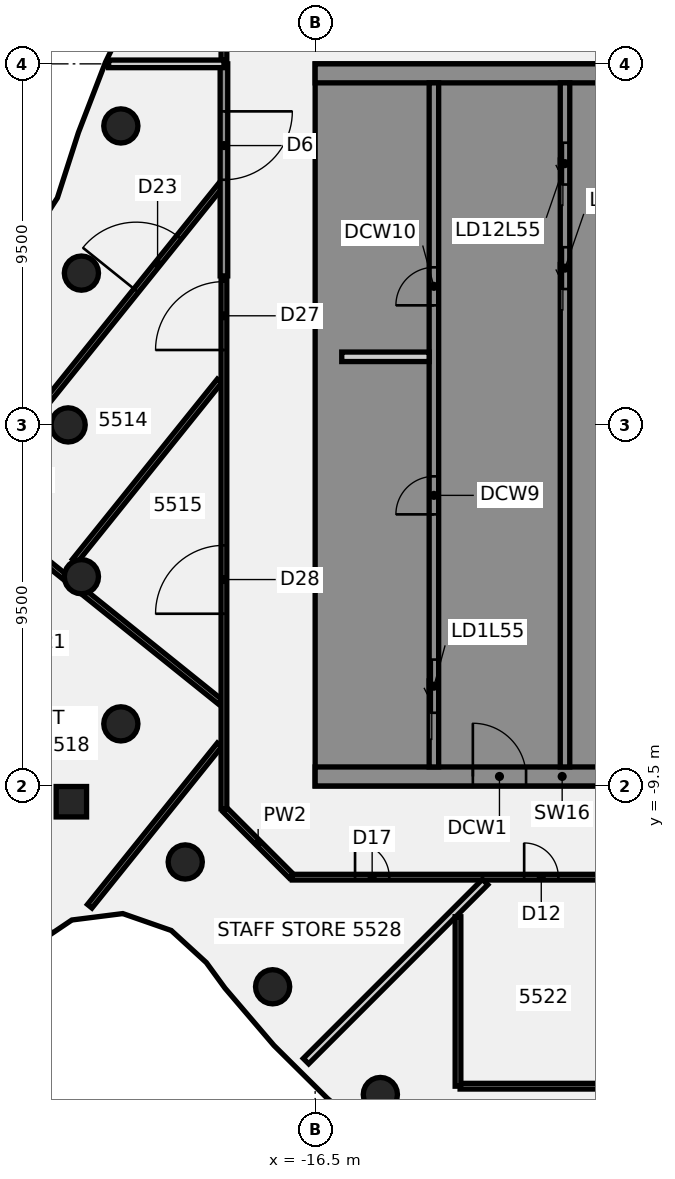
"""IFC4 building model, lengths in metres.
Left out: names, types, materials, properties, quantities, classifications, styles, units other than length and angle.
Written with IfcOpenShell. Run it as: python <this file> out.ifc"""

import sys

from ifc_helpers import new_model, si_unit, direction, frame, frame_2d, origin, origin_2d, place, context, subcontext, project, spatial, polyline, rectangle, circle, outline, extrude, element, fill, save


model = new_model("IFC4")
c1 = context("Model", 3, precision=1e-05, world=origin(), true_north=direction((0.0, 1.0)))
c2 = subcontext(c1, "Body", "Model", "MODEL_VIEW")
j1 = project(units=[si_unit("LENGTHUNIT", "METRE"), si_unit("PLANEANGLEUNIT", "RADIAN")], contexts=[c1])
p1 = place(None, origin())
s1 = spatial("IfcSite", under=j1, at=p1, CompositionType="ELEMENT")
p2 = place(p1, origin())
s2 = spatial("IfcBuilding", under=s1, at=p2, CompositionType="ELEMENT")
p3 = place(p2, frame((0.0, 0.0, 219.9)))
s3 = spatial("IfcBuildingStorey", under=s2, at=p3, CompositionType="ELEMENT", Elevation=219.9)
for number, where, z_axis, x_axis in (
    (1, (-21.613, 7.866, -0.14), (0.0, 0.0, 1.0), (1.0, 0.0, 0.0)),
    (2, (-22.651, 3.994, -0.14), (0.0, 0.0, 1.0), (1.0, 0.0, 0.0)),
    (3, (-23.0, 0.0, -0.14), (0.0, 0.0, 1.0), (1.0, 0.0, 0.0)),
    (4, (-22.651, -3.994, -0.14), (0.0, 0.0, 1.0), (1.0, 0.0, 0.0)),
    (5, (-21.613, -7.866, -0.14), (0.0, 0.0, 1.0), (1.0, 0.0, 0.0)),
    (6, (-19.919, -11.5, -0.14), (0.0, 0.0, 1.0), (1.0, 0.0, 0.0)),
    (7, (-17.619, -14.784, -0.14), (0.0, 0.0, 1.0), (1.0, 0.0, 0.0)),
    (8, (-14.784, -17.619, -0.14), (0.0, 0.0, 1.0), (1.0, 0.0, 0.0)),
):
    element("IfcColumn", number, at=place(p3, frame(where, z_axis=z_axis, x_axis=x_axis)), inside=s3, PredefinedType="COLUMN", context=c2, shape_type="SweptSolid", body=[
        extrude(circle(Radius=0.45, at=origin_2d()), origin(), (0.0, 0.0, 1.0), 3.6),
    ])
p4 = place(p3, frame((-22.915, -9.915, -0.134), z_axis=(0.050218113387, -0.004139601239, 0.998729695558), x_axis=(-0.7786689847, 0.626044507658, 0.04174789452)))
e9 = element("IfcColumn", 9, at=p4, inside=s3, PredefinedType="COLUMN", context=c2, shape_type="SweptSolid", body=[
    extrude(rectangle(XDim=0.8, YDim=0.8, at=origin_2d()), origin(), (0.0, 0.0, 1.0), 3.598),
])
p5 = place(p3, frame((-18.872, -10.128, 0.0), z_axis=(0.0, 0.0, 1.0), x_axis=(0.707106781187, -0.707106781187, 0.0)))
e10 = element("IfcWall", 10, at=p5, inside=s3, PredefinedType="PARTITIONING", context=c2, shape_type="SweptSolid", body=[
    extrude(rectangle(XDim=2.465, YDim=0.15, at=frame_2d((1.232, 0.0))), origin(), (0.0, 0.0, 1.0), 2.864),
])
p6 = place(p3, frame((-29.602, 1.236, 0.0), z_axis=(0.0, 0.0, 1.0), x_axis=(0.779408775424, -0.626515730681, 0.0)))
e11 = element("IfcWall", 11, at=p6, inside=s3, PredefinedType="PARTITIONING", context=c2, shape_type="SweptSolid", body=[
    extrude(rectangle(XDim=8.332, YDim=0.15, at=frame_2d((4.166, 0.0))), origin(), (0.0, 0.0, 1.0), 2.864),
])
p7 = place(p6, frame((5.799, 0.0, 0.0)))
e12 = element("IfcOpeningElement", 12, at=p7, cuts=e11, PredefinedType="OPENING", context=c2, shape_type="SweptSolid", body=[
    extrude(rectangle(XDim=1.4, YDim=2.1, at=frame_2d((0.7, 1.05))), frame((0.0, 0.085, 0.0), z_axis=(0.0, -1.0, 0.0), x_axis=(1.0, 0.0, 0.0)), (0.0, 0.0, 1.0), 0.17),
])
p8 = place(p3, frame((-22.555, -4.428, 0.0), z_axis=(0.0, 0.0, 1.0), x_axis=(0.779423896045, -0.626496919604, 0.0)))
e13 = element("IfcWall", 13, at=p8, inside=s3, PredefinedType="PARTITIONING", context=c2, shape_type="SweptSolid", body=[
    extrude(rectangle(XDim=4.556, YDim=0.15, at=frame_2d((2.278, 0.0))), origin(), (0.0, 0.0, 1.0), 2.864),
])
p9 = place(p3, frame((-17.1, -11.9, 0.0), z_axis=(0.0, 0.0, 1.0), x_axis=(1.0, 0.0, 0.0)))
e14 = element("IfcWall", 14, at=p9, inside=s3, PredefinedType="PARTITIONING", context=c2, shape_type="SweptSolid", body=[
    extrude(rectangle(XDim=34.165, YDim=0.15, at=frame_2d((17.083, 0.0))), origin(), (0.0, 0.0, 1.0), 2.864),
])
p10 = place(p9, frame((6.1, 0.0, 0.0)))
e15 = element("IfcOpeningElement", 15, at=p10, cuts=e14, PredefinedType="OPENING", context=c2, shape_type="SweptSolid", body=[
    extrude(rectangle(XDim=0.9, YDim=2.1, at=frame_2d((0.45, 1.05))), frame((0.0, 0.085, 0.0), z_axis=(0.0, -1.0, 0.0), x_axis=(1.0, 0.0, 0.0)), (0.0, 0.0, 1.0), 0.17),
])
p11 = place(p9, frame((27.541, 0.0, 0.0)))
e16 = element("IfcOpeningElement", 16, at=p11, cuts=e14, PredefinedType="OPENING", context=c2, shape_type="SweptSolid", body=[
    extrude(rectangle(XDim=0.9, YDim=2.1, at=frame_2d((0.45, 1.05))), frame((0.0, 0.085, 0.0), z_axis=(0.0, -1.0, 0.0), x_axis=(1.0, 0.0, 0.0)), (0.0, 0.0, 1.0), 0.17),
])
p12 = place(p9, frame((19.152, 0.0, 0.0)))
e17 = element("IfcOpeningElement", 17, at=p12, cuts=e14, PredefinedType="OPENING", context=c2, shape_type="SweptSolid", body=[
    extrude(rectangle(XDim=1.8, YDim=2.1, at=frame_2d((0.9, 1.05))), frame((0.0, 0.085, 0.0), z_axis=(0.0, -1.0, 0.0), x_axis=(1.0, 0.0, 0.0)), (0.0, 0.0, 1.0), 0.17),
])
p13 = place(p9, frame((10.359, 0.0, 0.0)))
e18 = element("IfcOpeningElement", 18, at=p13, cuts=e14, PredefinedType="OPENING", context=c2, shape_type="SweptSolid", body=[
    extrude(rectangle(XDim=1.8, YDim=2.1, at=frame_2d((0.9, 1.05))), frame((0.0, 0.085, 0.0), z_axis=(0.0, -1.0, 0.0), x_axis=(1.0, 0.0, 0.0)), (0.0, 0.0, 1.0), 0.17),
])
p14 = place(p9, frame((30.5, 0.0, 0.0)))
e19 = element("IfcOpeningElement", 19, at=p14, cuts=e14, PredefinedType="OPENING", context=c2, shape_type="SweptSolid", body=[
    extrude(rectangle(XDim=0.9, YDim=2.1, at=frame_2d((0.45, 1.05))), frame((0.0, 0.085, 0.0), z_axis=(0.0, -1.0, 0.0), x_axis=(1.0, 0.0, 0.0)), (0.0, 0.0, 1.0), 0.17),
])
p15 = place(p9, frame((1.65, 0.0, 0.0)))
e20 = element("IfcOpeningElement", 20, at=p15, cuts=e14, PredefinedType="OPENING", context=c2, shape_type="SweptSolid", body=[
    extrude(rectangle(XDim=0.9, YDim=2.1, at=frame_2d((0.45, 1.05))), frame((0.0, 0.085, 0.0), z_axis=(0.0, -1.0, 0.0), x_axis=(1.0, 0.0, 0.0)), (0.0, 0.0, 1.0), 0.17),
])
p16 = place(p3, frame((-12.686, -17.4, 0.0), z_axis=(0.0, 0.0, 1.0), x_axis=(1.0, 0.0, 0.0)))
e21 = element("IfcWall", 21, at=p16, inside=s3, PredefinedType="PARTITIONING", context=c2, shape_type="SweptSolid", body=[
    extrude(rectangle(XDim=4.39, YDim=0.15, at=frame_2d((2.195, 0.0))), origin(), (0.0, 0.0, 1.0), 2.864),
])
p17 = place(p3, frame((-16.74, -16.74, 0.0), z_axis=(0.0, 0.0, 1.0), x_axis=(0.707106781187, 0.707106781187, 0.0)))
e22 = element("IfcWall", 22, at=p17, inside=s3, PredefinedType="PARTITIONING", context=c2, shape_type="SweptSolid", body=[
    extrude(rectangle(XDim=6.665, YDim=0.2, at=frame_2d((3.333, 0.0))), origin(), (0.0, 0.0, 1.0), 2.864),
])
p18 = place(p3, frame((-25.578, -1.897, 0.0), z_axis=(0.0, 0.0, 1.0), x_axis=(0.626651590672, 0.779299546971, 0.0)))
e23 = element("IfcWall", 23, at=p18, inside=s3, PredefinedType="PARTITIONING", context=c2, shape_type="SweptSolid", body=[
    extrude(rectangle(XDim=10.656, YDim=0.15, at=frame_2d((5.328, 0.0))), origin(), (0.0, 0.0, 1.0), 2.864),
])
p19 = place(p18, frame((6.97, 0.0, 0.0)))
e24 = element("IfcOpeningElement", 24, at=p19, cuts=e23, PredefinedType="OPENING", context=c2, shape_type="SweptSolid", body=[
    extrude(rectangle(XDim=1.8, YDim=2.1, at=frame_2d((0.9, 1.05))), frame((0.0, 0.085, 0.0), z_axis=(0.0, -1.0, 0.0), x_axis=(1.0, 0.0, 0.0)), (0.0, 0.0, 1.0), 0.17),
])
p20 = place(p3, frame((-22.826, -3.581, 0.0), z_axis=(0.0, 0.0, 1.0), x_axis=(0.626622427276, 0.779322996988, 0.0)))
e25 = element("IfcWall", 25, at=p20, inside=s3, PredefinedType="PARTITIONING", context=c2, shape_type="SweptSolid", body=[
    extrude(rectangle(XDim=6.08, YDim=0.15, at=frame_2d((3.04, 0.0))), origin(), (0.0, 0.0, 1.0), 2.864),
])
p21 = place(p3, frame((-22.432, -12.665, 0.0), z_axis=(0.0, 0.0, 1.0), x_axis=(0.626703070083, 0.779258148464, 0.0)))
e26 = element("IfcWall", 26, at=p21, inside=s3, PredefinedType="PARTITIONING", context=c2, shape_type="SweptSolid", body=[
    extrude(rectangle(XDim=5.451, YDim=0.15, at=frame_2d((2.725, 0.0))), origin(), (0.0, 0.0, 1.0), 2.864),
])
p22 = place(p3, frame((-18.9, -10.1, 0.0), z_axis=(0.0, 0.0, 1.0), x_axis=(0.0, 1.0, 0.0)))
e27 = element("IfcWall", 27, at=p22, inside=s3, PredefinedType="PARTITIONING", context=c2, shape_type="SweptSolid", body=[
    extrude(rectangle(XDim=13.921, YDim=0.15, at=frame_2d((6.96, 0.0))), origin(), (0.0, 0.0, 1.0), 2.864),
])
p23 = place(p22, frame((12.071, 0.0, 0.0)))
e28 = element("IfcOpeningElement", 28, at=p23, cuts=e27, PredefinedType="OPENING", context=c2, shape_type="SweptSolid", body=[
    extrude(rectangle(XDim=1.8, YDim=2.1, at=frame_2d((0.9, 1.05))), frame((0.0, 0.085, 0.0), z_axis=(0.0, -1.0, 0.0), x_axis=(1.0, 0.0, 0.0)), (0.0, 0.0, 1.0), 0.17),
])
p24 = place(p22, frame((5.131, 0.0, 0.0)))
e29 = element("IfcOpeningElement", 29, at=p24, cuts=e27, PredefinedType="OPENING", context=c2, shape_type="SweptSolid", body=[
    extrude(rectangle(XDim=1.8, YDim=2.1, at=frame_2d((0.9, 1.05))), frame((0.0, 0.085, 0.0), z_axis=(0.0, -1.0, 0.0), x_axis=(1.0, 0.0, 0.0)), (0.0, 0.0, 1.0), 0.17),
])
p25 = place(p3, frame((-18.9, 9.6, 0.0), z_axis=(0.0, 0.0, 1.0), x_axis=(0.0, 1.0, 0.0)))
e30 = element("IfcWall", 30, at=p25, inside=s3, PredefinedType="PARTITIONING", context=c2, shape_type="SweptSolid", body=[
    extrude(rectangle(XDim=0.5, YDim=0.15, at=frame_2d((0.25, 0.0))), origin(), (0.0, 0.0, 1.0), 2.864),
])
p26 = place(p3, frame((-12.741, -17.4, 0.0), z_axis=(0.0, 0.0, 1.0), x_axis=(0.0, 1.0, 0.0)))
e31 = element("IfcWall", 31, at=p26, inside=s3, PredefinedType="PARTITIONING", context=c2, shape_type="SweptSolid", body=[
    extrude(rectangle(XDim=4.459, YDim=0.15, at=frame_2d((2.229, 0.0))), origin(), (0.0, 0.0, 1.0), 2.864),
])
p27 = place(p3, frame((-18.9, 9.5, 0.0), z_axis=(0.0, 0.0, 1.0), x_axis=(0.0, -1.0, 0.0)))
e32 = element("IfcWall", 32, at=p27, inside=s3, PredefinedType="SOLIDWALL", context=c2, shape_type="SweptSolid", body=[
    extrude(rectangle(XDim=5.579, YDim=0.2, at=frame_2d((2.79, 0.0))), origin(), (0.0, 0.0, 1.0), 2.964),
])
p28 = place(p27, frame((1.25, 0.0, 0.0)))
e33 = element("IfcOpeningElement", 33, at=p28, cuts=e32, PredefinedType="OPENING", context=c2, shape_type="SweptSolid", body=[
    extrude(rectangle(XDim=1.8, YDim=2.4, at=frame_2d((0.9, 1.2))), frame((0.0, 0.11, 0.0), z_axis=(0.0, -1.0, 0.0), x_axis=(1.0, 0.0, 0.0)), (0.0, 0.0, 1.0), 0.22),
])
p29 = place(p3, frame((-18.9, 9.5, 0.0), z_axis=(0.0, 0.0, 1.0), x_axis=(-1.0, 0.0, 0.0)))
e34 = element("IfcWall", 34, at=p29, inside=s3, PredefinedType="SOLIDWALL", context=c2, shape_type="SweptSolid", body=[
    extrude(rectangle(XDim=3.033, YDim=0.2, at=frame_2d((1.517, 0.0))), origin(), (0.0, 0.0, 1.0), 3.46),
])
p30 = place(p3, frame((-16.5, -9.25, 0.0), z_axis=(0.0, 0.0, 1.0), x_axis=(1.0, 0.0, 0.0)))
e35 = element("IfcWall", 35, at=p30, inside=s3, PredefinedType="SHEAR", context=c2, shape_type="SweptSolid", body=[
    extrude(rectangle(XDim=13.0, YDim=0.5, at=frame_2d((6.5, 0.0))), origin(), (0.0, 0.0, 1.0), 3.46),
])
p31 = place(p30, frame((4.15, 0.0, 0.0)))
e36 = element("IfcOpeningElement", 36, at=p31, cuts=e35, PredefinedType="OPENING", context=c2, shape_type="SweptSolid", body=[
    extrude(rectangle(XDim=1.4, YDim=2.1, at=frame_2d((0.7, 1.05))), frame((0.0, 0.26, 0.0), z_axis=(0.0, -1.0, 0.0), x_axis=(1.0, 0.0, 0.0)), (0.0, 0.0, 1.0), 0.52),
])
p32 = place(p30, frame((10.125, 0.0, 0.0)))
e37 = element("IfcOpeningElement", 37, at=p32, cuts=e35, PredefinedType="OPENING", context=c2, shape_type="SweptSolid", body=[
    extrude(rectangle(XDim=1.4, YDim=2.1, at=frame_2d((0.7, 1.05))), frame((0.0, 0.26, 0.0), z_axis=(0.0, -1.0, 0.0), x_axis=(1.0, 0.0, 0.0)), (0.0, 0.0, 1.0), 0.52),
])
p33 = place(p3, origin())
e38 = element("IfcWall", 38, at=p33, inside=s3, PredefinedType="SHEAR", context=c2, shape_type="SweptSolid", body=[
    extrude(outline(polyline([(-13.5, -8.125), (-16.0, -8.125), (-16.0, -5.625), (-13.5, -5.625), (-13.5, -5.375), (-16.0, -5.375), (-16.0, 5.375), (-13.5, 5.375), (-13.5, 5.625), (-16.0, 5.625), (-16.0, 8.125), (-13.5, 8.125), (-13.5, 9.0), (-16.0, 9.0), (-16.5, 9.0), (-16.5, -9.0), (-16.0, -9.0), (-13.5, -9.0), (-13.5, -8.125)])), origin(), (0.0, 0.0, 1.0), 3.46),
])
p34 = place(p3, frame((-16.5, 9.25, 0.0), z_axis=(0.0, 0.0, 1.0), x_axis=(1.0, 0.0, 0.0)))
e39 = element("IfcWall", 39, at=p34, inside=s3, PredefinedType="SHEAR", context=c2, shape_type="SweptSolid", body=[
    extrude(rectangle(XDim=13.0, YDim=0.5, at=frame_2d((6.5, 0.0))), origin(), (0.0, 0.0, 1.0), 3.46),
])
p35 = place(p3, origin())
e40 = element("IfcWall", 40, at=p35, inside=s3, PredefinedType="SHEAR", context=c2, shape_type="SweptSolid", body=[
    extrude(outline(polyline([(-9.8, -5.375), (-9.8, -5.625), (-7.5, -5.625), (-7.25, -5.625), (-7.25, 9.0), (-7.5, 9.0), (-9.8, 9.0), (-9.8, 8.125), (-7.5, 8.125), (-7.5, 5.625), (-9.8, 5.625), (-9.8, 5.375), (-7.5, 5.375), (-7.5, 2.875), (-9.8, 2.875), (-9.8, 2.625), (-7.5, 2.625), (-7.5, 0.125), (-9.8, 0.125), (-9.8, -0.125), (-7.5, -0.125), (-7.5, -2.625), (-9.8, -2.625), (-9.8, -2.875), (-7.5, -2.875), (-7.5, -5.375), (-9.8, -5.375)])), origin(), (0.0, 0.0, 1.0), 3.46),
])
p36 = place(p3, origin())
e41 = element("IfcWall", 41, at=p36, inside=s3, PredefinedType="SHEAR", context=c2, shape_type="SweptSolid", body=[
    extrude(outline(polyline([(-7.5, -8.125), (-9.55, -8.125), (-9.55, -5.625), (-9.8, -5.625), (-9.8, -8.125), (-9.8, -9.0), (-7.5, -9.0), (-7.5, -8.125)])), origin(), (0.0, 0.0, 1.0), 3.46),
])
p37 = place(p3, frame((-13.375, -9.0, 0.0), z_axis=(0.0, 0.0, 1.0), x_axis=(0.0, 1.0, 0.0)))
e42 = element("IfcWall", 42, at=p37, inside=s3, PredefinedType="SHEAR", context=c2, shape_type="SweptSolid", body=[
    extrude(rectangle(XDim=18.0, YDim=0.25, at=frame_2d((9.0, 0.0))), origin(), (0.0, 0.0, 1.0), 3.46),
])
p38 = place(p37, frame((1.425, 0.0, 0.0)))
e43 = element("IfcOpeningElement", 43, at=p38, cuts=e42, PredefinedType="OPENING", context=c2, shape_type="SweptSolid", body=[
    extrude(rectangle(XDim=1.4, YDim=2.1, at=frame_2d((0.7, 1.05))), frame((0.0, 0.135, 0.0), z_axis=(0.0, -1.0, 0.0), x_axis=(1.0, 0.0, 0.0)), (0.0, 0.0, 1.0), 0.27),
])
p39 = place(p37, frame((6.646, 0.0, 0.0)))
e44 = element("IfcOpeningElement", 44, at=p39, cuts=e42, PredefinedType="OPENING", context=c2, shape_type="SweptSolid", body=[
    extrude(rectangle(XDim=1.0, YDim=2.1, at=frame_2d((0.5, 1.05))), frame((0.0, 0.135, 0.0), z_axis=(0.0, -1.0, 0.0), x_axis=(1.0, 0.0, 0.0)), (0.0, 0.0, 1.0), 0.27),
])
p40 = place(p37, frame((12.146, 0.0, 0.0)))
e45 = element("IfcOpeningElement", 45, at=p40, cuts=e42, PredefinedType="OPENING", context=c2, shape_type="SweptSolid", body=[
    extrude(rectangle(XDim=1.0, YDim=2.1, at=frame_2d((0.5, 1.05))), frame((0.0, 0.135, 0.0), z_axis=(0.0, -1.0, 0.0), x_axis=(1.0, 0.0, 0.0)), (0.0, 0.0, 1.0), 0.27),
])
p41 = place(p3, frame((-9.925, -9.0, 0.0), z_axis=(0.0, 0.0, 1.0), x_axis=(0.0, 1.0, 0.0)))
e46 = element("IfcWall", 46, at=p41, inside=s3, PredefinedType="SHEAR", context=c2, shape_type="SweptSolid", body=[
    extrude(rectangle(XDim=18.0, YDim=0.25, at=frame_2d((9.0, 0.0))), origin(), (0.0, 0.0, 1.0), 3.46),
])
p42 = place(p41, frame((12.575, 0.0, 0.0)))
e47 = element("IfcOpeningElement", 47, at=p42, cuts=e46, PredefinedType="OPENING", context=c2, shape_type="SweptSolid", body=[
    extrude(rectangle(XDim=1.1, YDim=2.1, at=frame_2d((0.55, 1.05))), frame((0.0, 0.135, 0.0), z_axis=(0.0, -1.0, 0.0), x_axis=(1.0, 0.0, 0.0)), (0.0, 0.0, 1.0), 0.27),
])
p43 = place(p41, frame((15.325, 0.0, 0.0)))
e48 = element("IfcOpeningElement", 48, at=p43, cuts=e46, PredefinedType="OPENING", context=c2, shape_type="SweptSolid", body=[
    extrude(rectangle(XDim=1.1, YDim=2.1, at=frame_2d((0.55, 1.05))), frame((0.0, 0.135, 0.0), z_axis=(0.0, -1.0, 0.0), x_axis=(1.0, 0.0, 0.0)), (0.0, 0.0, 1.0), 0.27),
])
p44 = place(p3, frame((-15.8, 1.792, 0.0), z_axis=(0.0, 0.0, 1.0), x_axis=(1.0, 0.0, 0.0)))
e49 = element("IfcWall", 49, at=p44, inside=s3, PredefinedType="PARTITIONING", context=c2, shape_type="SweptSolid", body=[
    extrude(rectangle(XDim=2.3, YDim=0.25, at=frame_2d((1.15, 0.0))), origin(), (0.0, 0.0, 1.0), 3.46),
])
p45 = place(p10, frame((0.9, 0.0, 0.0), z_axis=(0.0, 0.0, 1.0), x_axis=(-1.0, 0.0, 0.0)))
e50 = element("IfcDoor", 50, at=p45, inside=s3, OperationType="SINGLE_SWING_LEFT", PredefinedType="DOOR", context=c2, shape_type="SweptSolid", body=[
    extrude(rectangle(XDim=0.9, YDim=2.1, at=frame_2d((0.45, 1.05))), frame((0.0, 0.025, 0.0), z_axis=(0.0, -1.0, 0.0), x_axis=(1.0, 0.0, 0.0)), (0.0, 0.0, 1.0), 0.05),
])
fill(e15, e50)
p46 = place(p15, frame((0.9, 0.0, 0.0), z_axis=(0.0, 0.0, 1.0), x_axis=(-1.0, 0.0, 0.0)))
e51 = element("IfcDoor", 51, at=p46, inside=s3, OperationType="SINGLE_SWING_LEFT", PredefinedType="DOOR", context=c2, shape_type="SweptSolid", body=[
    extrude(rectangle(XDim=0.9, YDim=2.1, at=frame_2d((0.45, 1.05))), frame((0.0, 0.025, 0.0), z_axis=(0.0, -1.0, 0.0), x_axis=(1.0, 0.0, 0.0)), (0.0, 0.0, 1.0), 0.05),
])
fill(e20, e51)
p47 = place(p19, origin())
e52 = element("IfcDoor", 52, at=p47, inside=s3, OperationType="DOUBLE_DOOR_SINGLE_SWING", PredefinedType="DOOR", context=c2, shape_type="SweptSolid", body=[
    extrude(rectangle(XDim=1.8, YDim=2.1, at=frame_2d((0.9, 1.05))), frame((0.0, 0.025, 0.0), z_axis=(0.0, -1.0, 0.0), x_axis=(1.0, 0.0, 0.0)), (0.0, 0.0, 1.0), 0.05),
])
fill(e24, e52)
p48 = place(p23, frame((1.8, 0.0, 0.0), z_axis=(0.0, 0.0, 1.0), x_axis=(-1.0, 0.0, 0.0)))
e53 = element("IfcDoor", 53, at=p48, inside=s3, OperationType="DOUBLE_DOOR_SINGLE_SWING", PredefinedType="DOOR", context=c2, shape_type="SweptSolid", body=[
    extrude(rectangle(XDim=1.8, YDim=2.1, at=frame_2d((0.9, 1.05))), frame((0.0, 0.025, 0.0), z_axis=(0.0, -1.0, 0.0), x_axis=(1.0, 0.0, 0.0)), (0.0, 0.0, 1.0), 0.05),
])
fill(e28, e53)
p49 = place(p24, origin())
e54 = element("IfcDoor", 54, at=p49, inside=s3, OperationType="DOUBLE_DOOR_SINGLE_SWING", PredefinedType="DOOR", context=c2, shape_type="SweptSolid", body=[
    extrude(rectangle(XDim=1.8, YDim=2.1, at=frame_2d((0.9, 1.05))), frame((0.0, 0.025, 0.0), z_axis=(0.0, -1.0, 0.0), x_axis=(1.0, 0.0, 0.0)), (0.0, 0.0, 1.0), 0.05),
])
fill(e29, e54)
p50 = place(p28, origin())
e55 = element("IfcDoor", 55, at=p50, inside=s3, OperationType="SINGLE_SWING_LEFT", PredefinedType="DOOR", context=c2, shape_type="SweptSolid", body=[
    extrude(rectangle(XDim=1.8, YDim=2.4, at=frame_2d((0.9, 1.2))), frame((0.0, 0.025, 0.0), z_axis=(0.0, -1.0, 0.0), x_axis=(1.0, 0.0, 0.0)), (0.0, 0.0, 1.0), 0.05),
])
fill(e33, e55)
p51 = place(p31, origin())
e56 = element("IfcDoor", 56, at=p51, inside=s3, OperationType="SINGLE_SWING_LEFT", PredefinedType="DOOR", context=c2, shape_type="SweptSolid", body=[
    extrude(rectangle(XDim=1.4, YDim=2.1, at=frame_2d((0.7, 1.05))), frame((0.0, 0.025, 0.0), z_axis=(0.0, -1.0, 0.0), x_axis=(1.0, 0.0, 0.0)), (0.0, 0.0, 1.0), 0.05),
])
fill(e36, e56)
p52 = place(p38, origin())
e57 = element("IfcDoor", 57, at=p52, inside=s3, OperationType="SLIDING_TO_LEFT", PredefinedType="DOOR", context=c2, shape_type="SweptSolid", body=[
    extrude(rectangle(XDim=1.4, YDim=2.1, at=frame_2d((0.7, 1.05))), frame((0.0, 0.025, 0.0), z_axis=(0.0, -1.0, 0.0), x_axis=(1.0, 0.0, 0.0)), (0.0, 0.0, 1.0), 0.05),
])
fill(e43, e57)
p53 = place(p42, origin())
e58 = element("IfcDoor", 58, at=p53, inside=s3, OperationType="SLIDING_TO_LEFT", PredefinedType="DOOR", context=c2, shape_type="SweptSolid", body=[
    extrude(rectangle(XDim=1.1, YDim=2.1, at=frame_2d((0.55, 1.05))), frame((0.0, 0.025, 0.0), z_axis=(0.0, -1.0, 0.0), x_axis=(1.0, 0.0, 0.0)), (0.0, 0.0, 1.0), 0.05),
])
fill(e47, e58)
p54 = place(p43, origin())
e59 = element("IfcDoor", 59, at=p54, inside=s3, OperationType="SLIDING_TO_LEFT", PredefinedType="DOOR", context=c2, shape_type="SweptSolid", body=[
    extrude(rectangle(XDim=1.1, YDim=2.1, at=frame_2d((0.55, 1.05))), frame((0.0, 0.025, 0.0), z_axis=(0.0, -1.0, 0.0), x_axis=(1.0, 0.0, 0.0)), (0.0, 0.0, 1.0), 0.05),
])
fill(e48, e59)
p55 = place(p39, origin())
e60 = element("IfcDoor", 60, at=p55, inside=s3, OperationType="SINGLE_SWING_LEFT", PredefinedType="DOOR", context=c2, shape_type="SweptSolid", body=[
    extrude(rectangle(XDim=1.0, YDim=2.1, at=frame_2d((0.5, 1.05))), frame((0.0, 0.025, 0.0), z_axis=(0.0, -1.0, 0.0), x_axis=(1.0, 0.0, 0.0)), (0.0, 0.0, 1.0), 0.05),
])
fill(e44, e60)
p56 = place(p40, origin())
e61 = element("IfcDoor", 61, at=p56, inside=s3, OperationType="SINGLE_SWING_LEFT", PredefinedType="DOOR", context=c2, shape_type="SweptSolid", body=[
    extrude(rectangle(XDim=1.0, YDim=2.1, at=frame_2d((0.5, 1.05))), frame((0.0, 0.025, 0.0), z_axis=(0.0, -1.0, 0.0), x_axis=(1.0, 0.0, 0.0)), (0.0, 0.0, 1.0), 0.05),
])
fill(e45, e61)
save(model, sys.argv[1])
